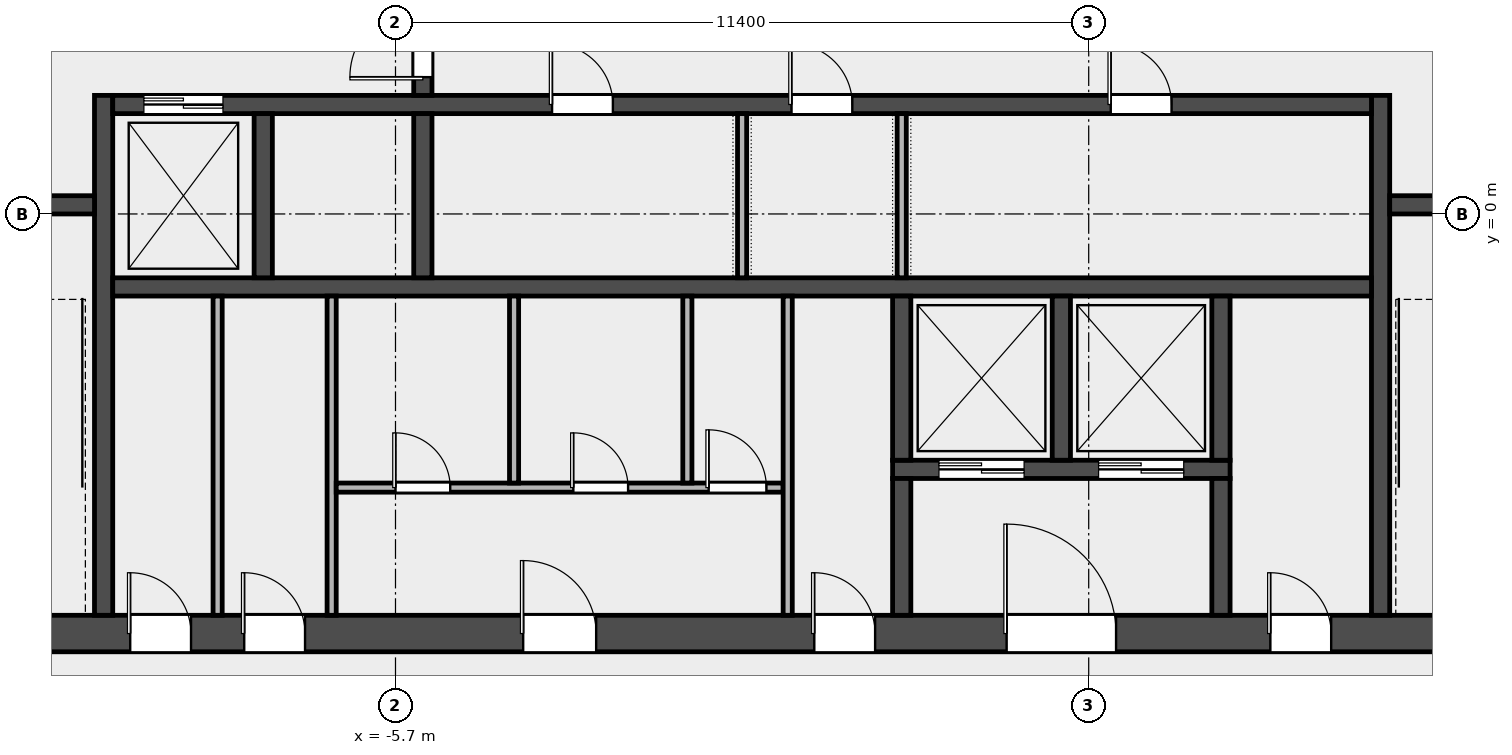
"""IFC4 building model, lengths in metres.
Left out: names, types, materials, properties, quantities, classifications, styles, units other than length and angle.
Written with IfcOpenShell. Run it as: python <this file> out.ifc"""

import sys

from ifc_helpers import new_model, si_unit, direction, frame, frame_2d, origin, place, context, subcontext, project, spatial, rectangle, extrude, element, fill, save


model = new_model("IFC4")
c1 = context("Model", 3, precision=1e-05, world=origin(), true_north=direction((0.0, 1.0)))
c2 = subcontext(c1, "Body", "Model", "MODEL_VIEW")
j1 = project(units=[si_unit("LENGTHUNIT", "METRE"), si_unit("PLANEANGLEUNIT", "RADIAN")], contexts=[c1])
p1 = place(None, origin())
s1 = spatial("IfcSite", under=j1, at=p1, CompositionType="ELEMENT")
p2 = place(p1, origin())
s2 = spatial("IfcBuilding", under=s1, at=p2, CompositionType="ELEMENT")
p3 = place(p2, frame((0.0, 0.0, 307.4)))
s3 = spatial("IfcBuildingStorey", under=s2, at=p3, CompositionType="ELEMENT", Elevation=307.4)
p4 = place(p3, frame((-14.4, -6.9, 0.0), z_axis=(0.0, 0.0, 1.0), x_axis=(1.0, 0.0, 0.0)))
e1 = element("IfcWall", 1, at=p4, inside=s3, PredefinedType="SHEAR", context=c2, shape_type="SweptSolid", body=[
    extrude(rectangle(XDim=28.8, YDim=0.6, at=frame_2d((14.4, 0.0))), origin(), (0.0, 0.0, 1.0), 3.7),
])
p5 = place(p4, frame((4.337, 0.0, 0.0)))
e2 = element("IfcOpeningElement", 2, at=p5, cuts=e1, PredefinedType="OPENING", context=c2, shape_type="SweptSolid", body=[
    extrude(rectangle(XDim=1.0, YDim=2.1, at=frame_2d((0.5, 1.05))), frame((0.0, 0.312, 0.0), z_axis=(0.0, -1.0, 0.0), x_axis=(1.0, 0.0, 0.0)), (0.0, 0.0, 1.0), 0.624),
])
p6 = place(p4, frame((6.212, 0.0, 0.0)))
e3 = element("IfcOpeningElement", 3, at=p6, cuts=e1, PredefinedType="OPENING", context=c2, shape_type="SweptSolid", body=[
    extrude(rectangle(XDim=1.0, YDim=2.1, at=frame_2d((0.5, 1.05))), frame((0.0, 0.312, 0.0), z_axis=(0.0, -1.0, 0.0), x_axis=(1.0, 0.0, 0.0)), (0.0, 0.0, 1.0), 0.624),
])
p7 = place(p4, frame((10.8, 0.0, 0.0)))
e4 = element("IfcOpeningElement", 4, at=p7, cuts=e1, PredefinedType="OPENING", context=c2, shape_type="SweptSolid", body=[
    extrude(rectangle(XDim=1.2, YDim=2.1, at=frame_2d((0.6, 1.05))), frame((0.0, 0.312, 0.0), z_axis=(0.0, -1.0, 0.0), x_axis=(1.0, 0.0, 0.0)), (0.0, 0.0, 1.0), 0.624),
])
p8 = place(p4, frame((15.587, 0.0, 0.0)))
e5 = element("IfcOpeningElement", 5, at=p8, cuts=e1, PredefinedType="OPENING", context=c2, shape_type="SweptSolid", body=[
    extrude(rectangle(XDim=1.0, YDim=2.1, at=frame_2d((0.5, 1.05))), frame((0.0, 0.312, 0.0), z_axis=(0.0, -1.0, 0.0), x_axis=(1.0, 0.0, 0.0)), (0.0, 0.0, 1.0), 0.624),
])
p9 = place(p4, frame((18.75, 0.0, 0.0)))
e6 = element("IfcOpeningElement", 6, at=p9, cuts=e1, PredefinedType="OPENING", context=c2, shape_type="SweptSolid", body=[
    extrude(rectangle(XDim=1.8, YDim=2.1, at=frame_2d((0.9, 1.05))), frame((0.0, 0.312, 0.0), z_axis=(0.0, -1.0, 0.0), x_axis=(1.0, 0.0, 0.0)), (0.0, 0.0, 1.0), 0.624),
])
p10 = place(p4, frame((23.087, 0.0, 0.0)))
e7 = element("IfcOpeningElement", 7, at=p10, cuts=e1, PredefinedType="OPENING", context=c2, shape_type="SweptSolid", body=[
    extrude(rectangle(XDim=1.0, YDim=2.1, at=frame_2d((0.5, 1.05))), frame((0.0, 0.312, 0.0), z_axis=(0.0, -1.0, 0.0), x_axis=(1.0, 0.0, 0.0)), (0.0, 0.0, 1.0), 0.624),
])
for number, where, z_axis, x_axis in (
    (8, (-10.5, -6.6, 0.0), (0.0, 0.0, 1.0), (0.0, 1.0, 0.0)),
    (9, (10.5, -6.6, 0.0), (0.0, 0.0, 1.0), (0.0, 1.0, 0.0)),
):
    element("IfcWall", number, at=place(p3, frame(where, z_axis=z_axis, x_axis=x_axis)), inside=s3, PredefinedType="SHEAR", context=c2, shape_type="SweptSolid", body=[
        extrude(rectangle(XDim=8.55, YDim=0.3, at=frame_2d((4.275, 0.0))), origin(), (0.0, 0.0, 1.0), 3.7),
    ])
p11 = place(p3, frame((-13.8, 0.15, 0.0), z_axis=(0.0, 0.0, 1.0), x_axis=(1.0, 0.0, 0.0)))
e10 = element("IfcWall", 10, at=p11, inside=s3, PredefinedType="SOLIDWALL", context=c2, shape_type="SweptSolid", body=[
    extrude(rectangle(XDim=3.15, YDim=0.3, at=frame_2d((1.575, 0.0))), origin(), (0.0, 0.0, 1.0), 3.7),
])
p12 = place(p11, frame((0.975, 0.0, 0.0)))
e11 = element("IfcOpeningElement", 11, at=p12, cuts=e10, PredefinedType="OPENING", context=c2, shape_type="SweptSolid", body=[
    extrude(rectangle(XDim=1.1, YDim=2.1, at=frame_2d((0.55, 1.05))), frame((0.0, 0.162, 0.0), z_axis=(0.0, -1.0, 0.0), x_axis=(1.0, 0.0, 0.0)), (0.0, 0.0, 1.0), 0.324),
])
p13 = place(p3, frame((10.65, 0.15, 0.0), z_axis=(0.0, 0.0, 1.0), x_axis=(1.0, 0.0, 0.0)))
e12 = element("IfcWall", 12, at=p13, inside=s3, PredefinedType="SOLIDWALL", context=c2, shape_type="SweptSolid", body=[
    extrude(rectangle(XDim=3.15, YDim=0.3, at=frame_2d((1.575, 0.0))), origin(), (0.0, 0.0, 1.0), 3.7),
])
p14 = place(p13, frame((1.025, 0.0, 0.0)))
e13 = element("IfcOpeningElement", 13, at=p14, cuts=e12, PredefinedType="OPENING", context=c2, shape_type="SweptSolid", body=[
    extrude(rectangle(XDim=1.1, YDim=2.1, at=frame_2d((0.55, 1.05))), frame((0.0, 0.162, 0.0), z_axis=(0.0, -1.0, 0.0), x_axis=(1.0, 0.0, 0.0)), (0.0, 0.0, 1.0), 0.324),
])
p15 = place(p3, frame((-10.35, -1.2, 0.0), z_axis=(0.0, 0.0, 1.0), x_axis=(1.0, 0.0, 0.0)))
e14 = element("IfcWall", 14, at=p15, inside=s3, PredefinedType="SOLIDWALL", context=c2, shape_type="SweptSolid", body=[
    extrude(rectangle(XDim=20.7, YDim=0.3, at=frame_2d((10.35, 0.0))), origin(), (0.0, 0.0, 1.0), 3.7),
])
p16 = place(p3, frame((-10.35, 1.8, 0.0), z_axis=(0.0, 0.0, 1.0), x_axis=(1.0, 0.0, 0.0)))
e15 = element("IfcWall", 15, at=p16, inside=s3, PredefinedType="SOLIDWALL", context=c2, shape_type="SweptSolid", body=[
    extrude(rectangle(XDim=20.7, YDim=0.3, at=frame_2d((10.35, 0.0))), origin(), (0.0, 0.0, 1.0), 3.7),
])
p17 = place(p16, frame((0.512, 0.0, 0.0)))
e16 = element("IfcOpeningElement", 16, at=p17, cuts=e15, PredefinedType="OPENING", context=c2, shape_type="SweptSolid", body=[
    extrude(rectangle(XDim=1.3, YDim=2.1, at=frame_2d((0.65, 1.05))), frame((0.0, 0.162, 0.0), z_axis=(0.0, -1.0, 0.0), x_axis=(1.0, 0.0, 0.0)), (0.0, 0.0, 1.0), 0.324),
])
p18 = place(p16, frame((7.225, 0.0, 0.0)))
e17 = element("IfcOpeningElement", 17, at=p18, cuts=e15, PredefinedType="OPENING", context=c2, shape_type="SweptSolid", body=[
    extrude(rectangle(XDim=1.0, YDim=2.1, at=frame_2d((0.5, 1.05))), frame((0.0, 0.162, 0.0), z_axis=(0.0, -1.0, 0.0), x_axis=(1.0, 0.0, 0.0)), (0.0, 0.0, 1.0), 0.324),
])
p19 = place(p16, frame((11.163, 0.0, 0.0)))
e18 = element("IfcOpeningElement", 18, at=p19, cuts=e15, PredefinedType="OPENING", context=c2, shape_type="SweptSolid", body=[
    extrude(rectangle(XDim=1.0, YDim=2.1, at=frame_2d((0.5, 1.05))), frame((0.0, 0.162, 0.0), z_axis=(0.0, -1.0, 0.0), x_axis=(1.0, 0.0, 0.0)), (0.0, 0.0, 1.0), 0.324),
])
p20 = place(p16, frame((16.413, 0.0, 0.0)))
e19 = element("IfcOpeningElement", 19, at=p20, cuts=e15, PredefinedType="OPENING", context=c2, shape_type="SweptSolid", body=[
    extrude(rectangle(XDim=1.0, YDim=2.1, at=frame_2d((0.5, 1.05))), frame((0.0, 0.162, 0.0), z_axis=(0.0, -1.0, 0.0), x_axis=(1.0, 0.0, 0.0)), (0.0, 0.0, 1.0), 0.324),
])
for number, where, z_axis, x_axis in (
    (20, (-7.875, -1.05, 0.0), (0.0, 0.0, 1.0), (0.0, 1.0, 0.0)),
    (21, (-5.25, -1.05, 0.0), (0.0, 0.0, 1.0), (0.0, 1.0, 0.0)),
):
    element("IfcWall", number, at=place(p3, frame(where, z_axis=z_axis, x_axis=x_axis)), inside=s3, PredefinedType="SOLIDWALL", context=c2, shape_type="SweptSolid", body=[
        extrude(rectangle(XDim=2.7, YDim=0.3, at=frame_2d((1.35, 0.0))), origin(), (0.0, 0.0, 1.0), 3.7),
    ])
p21 = place(p3, frame((-5.25, 1.95, 0.0), z_axis=(0.0, 0.0, 1.0), x_axis=(0.0, 1.0, 0.0)))
e22 = element("IfcWall", 22, at=p21, inside=s3, PredefinedType="SOLIDWALL", context=c2, shape_type="SweptSolid", body=[
    extrude(rectangle(XDim=3.3, YDim=0.3, at=frame_2d((1.65, 0.0))), origin(), (0.0, 0.0, 1.0), 3.7),
])
p22 = place(p21, frame((0.3, 0.0, 0.0)))
e23 = element("IfcOpeningElement", 23, at=p22, cuts=e22, PredefinedType="OPENING", context=c2, shape_type="SweptSolid", body=[
    extrude(rectangle(XDim=1.2, YDim=2.1, at=frame_2d((0.6, 1.05))), frame((0.0, 0.162, 0.0), z_axis=(0.0, -1.0, 0.0), x_axis=(1.0, 0.0, 0.0)), (0.0, 0.0, 1.0), 0.324),
])
p23 = place(p21, frame((1.8, 0.0, 0.0)))
e24 = element("IfcOpeningElement", 24, at=p23, cuts=e22, PredefinedType="OPENING", context=c2, shape_type="SweptSolid", body=[
    extrude(rectangle(XDim=1.2, YDim=2.1, at=frame_2d((0.6, 1.05))), frame((0.0, 0.162, 0.0), z_axis=(0.0, -1.0, 0.0), x_axis=(1.0, 0.0, 0.0)), (0.0, 0.0, 1.0), 0.324),
])
p24 = place(p3, frame((2.475, -4.2, 0.0), z_axis=(0.0, 0.0, 1.0), x_axis=(1.0, 0.0, 0.0)))
e25 = element("IfcWall", 25, at=p24, inside=s3, PredefinedType="SOLIDWALL", context=c2, shape_type="SweptSolid", body=[
    extrude(rectangle(XDim=5.55, YDim=0.3, at=frame_2d((2.775, 0.0))), origin(), (0.0, 0.0, 1.0), 3.7),
])
p25 = place(p24, frame((0.762, 0.0, 0.0)))
e26 = element("IfcOpeningElement", 26, at=p25, cuts=e25, PredefinedType="OPENING", context=c2, shape_type="SweptSolid", body=[
    extrude(rectangle(XDim=1.4, YDim=2.1, at=frame_2d((0.7, 1.05))), frame((0.0, 0.162, 0.0), z_axis=(0.0, -1.0, 0.0), x_axis=(1.0, 0.0, 0.0)), (0.0, 0.0, 1.0), 0.324),
])
p26 = place(p24, frame((3.387, 0.0, 0.0)))
e27 = element("IfcOpeningElement", 27, at=p26, cuts=e25, PredefinedType="OPENING", context=c2, shape_type="SweptSolid", body=[
    extrude(rectangle(XDim=1.4, YDim=2.1, at=frame_2d((0.7, 1.05))), frame((0.0, 0.162, 0.0), z_axis=(0.0, -1.0, 0.0), x_axis=(1.0, 0.0, 0.0)), (0.0, 0.0, 1.0), 0.324),
])
p27 = place(p3, frame((2.625, -4.05, 0.0), z_axis=(0.0, 0.0, 1.0), x_axis=(0.0, 1.0, 0.0)))
e28 = element("IfcWall", 28, at=p27, inside=s3, PredefinedType="SOLIDWALL", context=c2, shape_type="SweptSolid", body=[
    extrude(rectangle(XDim=2.7, YDim=0.3, at=frame_2d((1.35, 0.0))), origin(), (0.0, 0.0, 1.0), 3.7),
])
p28 = place(p3, frame((2.625, -6.6, 0.0), z_axis=(0.0, 0.0, 1.0), x_axis=(0.0, 1.0, 0.0)))
e29 = element("IfcWall", 29, at=p28, inside=s3, PredefinedType="SOLIDWALL", context=c2, shape_type="SweptSolid", body=[
    extrude(rectangle(XDim=2.25, YDim=0.3, at=frame_2d((1.125, 0.0))), origin(), (0.0, 0.0, 1.0), 3.7),
])
for number, where, z_axis, x_axis in (
    (30, (5.25, -4.05, 0.0), (0.0, 0.0, 1.0), (0.0, 1.0, 0.0)),
    (31, (7.875, -4.05, 0.0), (0.0, 0.0, 1.0), (0.0, 1.0, 0.0)),
):
    element("IfcWall", number, at=place(p3, frame(where, z_axis=z_axis, x_axis=x_axis)), inside=s3, PredefinedType="SOLIDWALL", context=c2, shape_type="SweptSolid", body=[
        extrude(rectangle(XDim=2.7, YDim=0.3, at=frame_2d((1.35, 0.0))), origin(), (0.0, 0.0, 1.0), 3.7),
    ])
p29 = place(p3, frame((7.875, -6.6, 0.0), z_axis=(0.0, 0.0, 1.0), x_axis=(0.0, 1.0, 0.0)))
e32 = element("IfcWall", 32, at=p29, inside=s3, PredefinedType="SOLIDWALL", context=c2, shape_type="SweptSolid", body=[
    extrude(rectangle(XDim=2.25, YDim=0.3, at=frame_2d((1.125, 0.0))), origin(), (0.0, 0.0, 1.0), 3.7),
])
for number, where, z_axis, x_axis in (
    (33, (-8.625, -6.6, 0.0), (0.0, 0.0, 1.0), (0.0, 1.0, 0.0)),
    (34, (-6.75, -6.6, 0.0), (0.0, 0.0, 1.0), (0.0, 1.0, 0.0)),
):
    element("IfcWall", number, at=place(p3, frame(where, z_axis=z_axis, x_axis=x_axis)), inside=s3, PredefinedType="PARTITIONING", context=c2, shape_type="SweptSolid", body=[
        extrude(rectangle(XDim=5.25, YDim=0.15, at=frame_2d((2.625, 0.0))), origin(), (0.0, 0.0, 1.0), 3.7),
    ])
p30 = place(p3, frame((-6.675, -4.5, 0.0), z_axis=(0.0, 0.0, 1.0), x_axis=(1.0, 0.0, 0.0)))
e35 = element("IfcWall", 35, at=p30, inside=s3, PredefinedType="PARTITIONING", context=c2, shape_type="SweptSolid", body=[
    extrude(rectangle(XDim=7.35, YDim=0.15, at=frame_2d((3.675, 0.0))), origin(), (0.0, 0.0, 1.0), 3.7),
])
p31 = place(p30, frame((0.975, 0.0, 0.0)))
e36 = element("IfcOpeningElement", 36, at=p31, cuts=e35, PredefinedType="OPENING", context=c2, shape_type="SweptSolid", body=[
    extrude(rectangle(XDim=0.9, YDim=2.1, at=frame_2d((0.45, 1.05))), frame((0.0, 0.087, 0.0), z_axis=(0.0, -1.0, 0.0), x_axis=(1.0, 0.0, 0.0)), (0.0, 0.0, 1.0), 0.174),
])
p32 = place(p30, frame((3.9, 0.0, 0.0)))
e37 = element("IfcOpeningElement", 37, at=p32, cuts=e35, PredefinedType="OPENING", context=c2, shape_type="SweptSolid", body=[
    extrude(rectangle(XDim=0.9, YDim=2.1, at=frame_2d((0.45, 1.05))), frame((0.0, 0.087, 0.0), z_axis=(0.0, -1.0, 0.0), x_axis=(1.0, 0.0, 0.0)), (0.0, 0.0, 1.0), 0.174),
])
p33 = place(p30, frame((6.125, 0.0, 0.0)))
e38 = element("IfcOpeningElement", 38, at=p33, cuts=e35, PredefinedType="OPENING", context=c2, shape_type="SweptSolid", body=[
    extrude(rectangle(XDim=0.95, YDim=2.1, at=frame_2d((0.475, 1.05))), frame((0.0, 0.087, 0.0), z_axis=(0.0, -1.0, 0.0), x_axis=(1.0, 0.0, 0.0)), (0.0, 0.0, 1.0), 0.174),
])
for number, where, z_axis, x_axis in (
    (39, (-3.75, -4.425, 0.0), (0.0, 0.0, 1.0), (0.0, 1.0, 0.0)),
    (40, (-0.9, -4.425, 0.0), (0.0, 0.0, 1.0), (0.0, 1.0, 0.0)),
):
    element("IfcWall", number, at=place(p3, frame(where, z_axis=z_axis, x_axis=x_axis)), inside=s3, PredefinedType="PARTITIONING", context=c2, shape_type="SweptSolid", body=[
        extrude(rectangle(XDim=3.075, YDim=0.15, at=frame_2d((1.538, 0.0))), origin(), (0.0, 0.0, 1.0), 3.7),
    ])
p34 = place(p3, frame((0.75, -6.6, 0.0), z_axis=(0.0, 0.0, 1.0), x_axis=(0.0, 1.0, 0.0)))
e41 = element("IfcWall", 41, at=p34, inside=s3, PredefinedType="PARTITIONING", context=c2, shape_type="SweptSolid", body=[
    extrude(rectangle(XDim=5.25, YDim=0.15, at=frame_2d((2.625, 0.0))), origin(), (0.0, 0.0, 1.0), 3.7),
])
for number, where, z_axis, x_axis in (
    (42, (0.0, -1.05, 0.0), (0.0, 0.0, 1.0), (0.0, 1.0, 0.0)),
    (43, (2.625, -1.05, 0.0), (0.0, 0.0, 1.0), (0.0, 1.0, 0.0)),
):
    element("IfcWall", number, at=place(p3, frame(where, z_axis=z_axis, x_axis=x_axis)), inside=s3, PredefinedType="PARTITIONING", context=c2, shape_type="SweptSolid", body=[
        extrude(rectangle(XDim=2.7, YDim=0.15, at=frame_2d((1.35, 0.0))), origin(), (0.0, 0.0, 1.0), 3.7),
    ])
p35 = place(p22, origin())
e44 = element("IfcDoor", 44, at=p35, inside=s3, OperationType="SINGLE_SWING_LEFT", PredefinedType="DOOR", context=c2, shape_type="SweptSolid", body=[
    extrude(rectangle(XDim=1.2, YDim=2.1, at=frame_2d((0.6, 1.05))), frame((0.0, 0.025, 0.0), z_axis=(0.0, -1.0, 0.0), x_axis=(1.0, 0.0, 0.0)), (0.0, 0.0, 1.0), 0.05),
])
fill(e23, e44)
p36 = place(p17, origin())
e45 = element("IfcDoor", 45, at=p36, inside=s3, OperationType="DOUBLE_DOOR_SLIDING", PredefinedType="DOOR", context=c2, shape_type="SweptSolid", body=[
    extrude(rectangle(XDim=1.3, YDim=2.1, at=frame_2d((0.65, 1.05))), frame((0.0, 0.025, 0.0), z_axis=(0.0, -1.0, 0.0), x_axis=(1.0, 0.0, 0.0)), (0.0, 0.0, 1.0), 0.05),
])
fill(e16, e45)
p37 = place(p25, origin())
e46 = element("IfcDoor", 46, at=p37, inside=s3, OperationType="DOUBLE_DOOR_SLIDING", PredefinedType="DOOR", context=c2, shape_type="SweptSolid", body=[
    extrude(rectangle(XDim=1.4, YDim=2.1, at=frame_2d((0.7, 1.05))), frame((0.0, 0.025, 0.0), z_axis=(0.0, -1.0, 0.0), x_axis=(1.0, 0.0, 0.0)), (0.0, 0.0, 1.0), 0.05),
])
fill(e26, e46)
p38 = place(p26, origin())
e47 = element("IfcDoor", 47, at=p38, inside=s3, OperationType="DOUBLE_DOOR_SLIDING", PredefinedType="DOOR", context=c2, shape_type="SweptSolid", body=[
    extrude(rectangle(XDim=1.4, YDim=2.1, at=frame_2d((0.7, 1.05))), frame((0.0, 0.025, 0.0), z_axis=(0.0, -1.0, 0.0), x_axis=(1.0, 0.0, 0.0)), (0.0, 0.0, 1.0), 0.05),
])
fill(e27, e47)
p39 = place(p5, origin())
e48 = element("IfcDoor", 48, at=p39, inside=s3, OperationType="SINGLE_SWING_LEFT", PredefinedType="DOOR", context=c2, shape_type="SweptSolid", body=[
    extrude(rectangle(XDim=1.0, YDim=2.1, at=frame_2d((0.5, 1.05))), frame((0.0, 0.025, 0.0), z_axis=(0.0, -1.0, 0.0), x_axis=(1.0, 0.0, 0.0)), (0.0, 0.0, 1.0), 0.05),
])
fill(e2, e48)
p40 = place(p6, origin())
e49 = element("IfcDoor", 49, at=p40, inside=s3, OperationType="SINGLE_SWING_LEFT", PredefinedType="DOOR", context=c2, shape_type="SweptSolid", body=[
    extrude(rectangle(XDim=1.0, YDim=2.1, at=frame_2d((0.5, 1.05))), frame((0.0, 0.025, 0.0), z_axis=(0.0, -1.0, 0.0), x_axis=(1.0, 0.0, 0.0)), (0.0, 0.0, 1.0), 0.05),
])
fill(e3, e49)
p41 = place(p7, origin())
e50 = element("IfcDoor", 50, at=p41, inside=s3, OperationType="SINGLE_SWING_LEFT", PredefinedType="DOOR", context=c2, shape_type="SweptSolid", body=[
    extrude(rectangle(XDim=1.2, YDim=2.1, at=frame_2d((0.6, 1.05))), frame((0.0, 0.025, 0.0), z_axis=(0.0, -1.0, 0.0), x_axis=(1.0, 0.0, 0.0)), (0.0, 0.0, 1.0), 0.05),
])
fill(e4, e50)
p42 = place(p31, origin())
e51 = element("IfcDoor", 51, at=p42, inside=s3, OperationType="SINGLE_SWING_LEFT", PredefinedType="DOOR", context=c2, shape_type="SweptSolid", body=[
    extrude(rectangle(XDim=0.9, YDim=2.1, at=frame_2d((0.45, 1.05))), frame((0.0, 0.025, 0.0), z_axis=(0.0, -1.0, 0.0), x_axis=(1.0, 0.0, 0.0)), (0.0, 0.0, 1.0), 0.05),
])
fill(e36, e51)
p43 = place(p32, origin())
e52 = element("IfcDoor", 52, at=p43, inside=s3, OperationType="SINGLE_SWING_LEFT", PredefinedType="DOOR", context=c2, shape_type="SweptSolid", body=[
    extrude(rectangle(XDim=0.9, YDim=2.1, at=frame_2d((0.45, 1.05))), frame((0.0, 0.025, 0.0), z_axis=(0.0, -1.0, 0.0), x_axis=(1.0, 0.0, 0.0)), (0.0, 0.0, 1.0), 0.05),
])
fill(e37, e52)
p44 = place(p33, origin())
e53 = element("IfcDoor", 53, at=p44, inside=s3, OperationType="SINGLE_SWING_LEFT", PredefinedType="DOOR", context=c2, shape_type="SweptSolid", body=[
    extrude(rectangle(XDim=0.95, YDim=2.1, at=frame_2d((0.475, 1.05))), frame((0.0, 0.025, 0.0), z_axis=(0.0, -1.0, 0.0), x_axis=(1.0, 0.0, 0.0)), (0.0, 0.0, 1.0), 0.05),
])
fill(e38, e53)
p45 = place(p8, origin())
e54 = element("IfcDoor", 54, at=p45, inside=s3, OperationType="SINGLE_SWING_LEFT", PredefinedType="DOOR", context=c2, shape_type="SweptSolid", body=[
    extrude(rectangle(XDim=1.0, YDim=2.1, at=frame_2d((0.5, 1.05))), frame((0.0, 0.025, 0.0), z_axis=(0.0, -1.0, 0.0), x_axis=(1.0, 0.0, 0.0)), (0.0, 0.0, 1.0), 0.05),
])
fill(e5, e54)
p46 = place(p9, origin())
e55 = element("IfcDoor", 55, at=p46, inside=s3, OperationType="DOUBLE_DOOR_SINGLE_SWING", PredefinedType="DOOR", context=c2, shape_type="SweptSolid", body=[
    extrude(rectangle(XDim=1.8, YDim=2.1, at=frame_2d((0.9, 1.05))), frame((0.0, 0.025, 0.0), z_axis=(0.0, -1.0, 0.0), x_axis=(1.0, 0.0, 0.0)), (0.0, 0.0, 1.0), 0.05),
])
fill(e6, e55)
p47 = place(p10, origin())
e56 = element("IfcDoor", 56, at=p47, inside=s3, OperationType="SINGLE_SWING_LEFT", PredefinedType="DOOR", context=c2, shape_type="SweptSolid", body=[
    extrude(rectangle(XDim=1.0, YDim=2.1, at=frame_2d((0.5, 1.05))), frame((0.0, 0.025, 0.0), z_axis=(0.0, -1.0, 0.0), x_axis=(1.0, 0.0, 0.0)), (0.0, 0.0, 1.0), 0.05),
])
fill(e7, e56)
p48 = place(p18, origin())
e57 = element("IfcDoor", 57, at=p48, inside=s3, OperationType="SINGLE_SWING_LEFT", PredefinedType="DOOR", context=c2, shape_type="SweptSolid", body=[
    extrude(rectangle(XDim=1.0, YDim=2.1, at=frame_2d((0.5, 1.05))), frame((0.0, 0.025, 0.0), z_axis=(0.0, -1.0, 0.0), x_axis=(1.0, 0.0, 0.0)), (0.0, 0.0, 1.0), 0.05),
])
fill(e17, e57)
p49 = place(p19, origin())
e58 = element("IfcDoor", 58, at=p49, inside=s3, OperationType="SINGLE_SWING_LEFT", PredefinedType="DOOR", context=c2, shape_type="SweptSolid", body=[
    extrude(rectangle(XDim=1.0, YDim=2.1, at=frame_2d((0.5, 1.05))), frame((0.0, 0.025, 0.0), z_axis=(0.0, -1.0, 0.0), x_axis=(1.0, 0.0, 0.0)), (0.0, 0.0, 1.0), 0.05),
])
fill(e18, e58)
p50 = place(p20, origin())
e59 = element("IfcDoor", 59, at=p50, inside=s3, OperationType="SINGLE_SWING_LEFT", PredefinedType="DOOR", context=c2, shape_type="SweptSolid", body=[
    extrude(rectangle(XDim=1.0, YDim=2.1, at=frame_2d((0.5, 1.05))), frame((0.0, 0.025, 0.0), z_axis=(0.0, -1.0, 0.0), x_axis=(1.0, 0.0, 0.0)), (0.0, 0.0, 1.0), 0.05),
])
fill(e19, e59)
save(model, sys.argv[1])
